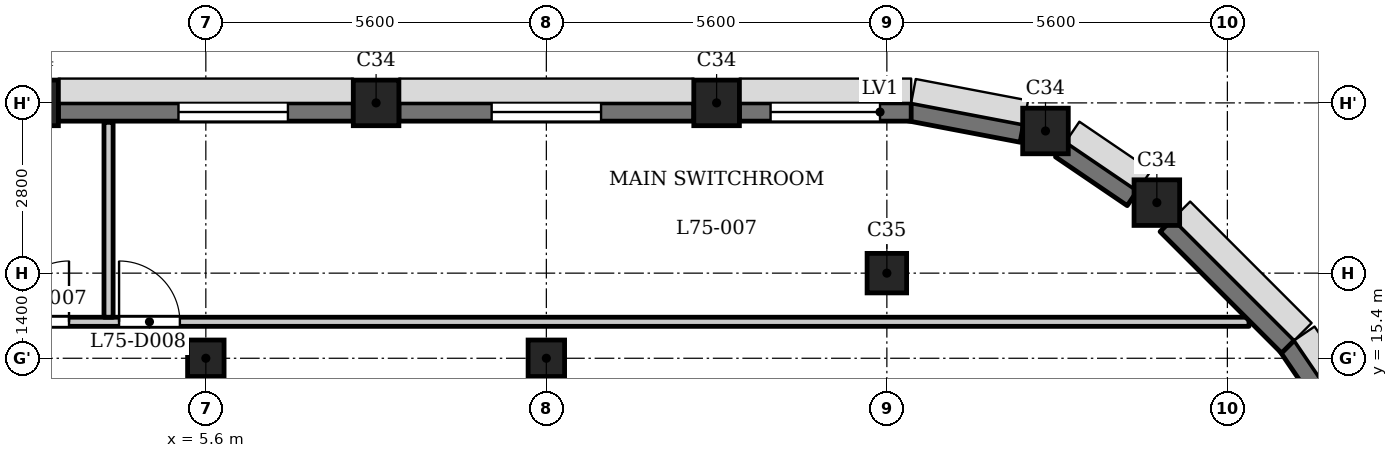
"""IFC4 building model, lengths in metres.
Left out: names, types, materials, properties, quantities, classifications, styles, units other than length and angle.
Written with IfcOpenShell. Run it as: python <this file> out.ifc"""

import sys

from ifc_helpers import new_model, si_unit, direction, frame, frame_2d, origin, origin_2d, place, context, subcontext, project, spatial, rectangle, extrude, element, fill, save


model = new_model("IFC4")
c1 = context("Model", 3, precision=1e-05, world=origin(), true_north=direction((0.0, 1.0)))
c2 = subcontext(c1, "Body", "Model", "MODEL_VIEW")
j1 = project(units=[si_unit("LENGTHUNIT", "METRE"), si_unit("PLANEANGLEUNIT", "RADIAN")], contexts=[c1])
p1 = place(None, origin())
s1 = spatial("IfcSite", under=j1, at=p1, CompositionType="ELEMENT")
p2 = place(p1, origin())
s2 = spatial("IfcBuilding", under=s1, at=p2, CompositionType="ELEMENT")
p3 = place(p2, frame((0.0, 0.0, 289.1)))
s3 = spatial("IfcBuildingStorey", under=s2, at=p3, CompositionType="ELEMENT", Elevation=289.1)
for number, where, z_axis, x_axis in (
    (1, (21.24, 17.96, 0.0), (0.0, 0.0, 1.0), (1.0, 0.0, 0.0)),
    (2, (19.409, 19.138, 0.0), (0.0, 0.0, 1.0), (1.0, 0.0, 0.0)),
    (3, (14.0, 19.6, 0.0), (0.0, 0.0, 1.0), (1.0, 0.0, 0.0)),
    (4, (8.4, 19.6, 0.0), (0.0, 0.0, 1.0), (1.0, 0.0, 0.0)),
    (5, (2.8, 19.6, 0.0), (0.0, 0.0, 1.0), (1.0, 0.0, 0.0)),
):
    element("IfcColumn", number, at=place(p3, frame(where, z_axis=z_axis, x_axis=x_axis)), inside=s3, PredefinedType="COLUMN", context=c2, shape_type="SweptSolid", body=[
        extrude(rectangle(XDim=0.75, YDim=0.75, at=origin_2d()), origin(), (0.0, 0.0, 1.0), 5.4),
    ])
p4 = place(p3, frame((16.8, 16.8, 0.0), z_axis=(0.0, 0.0, 1.0), x_axis=(1.0, 0.0, 0.0)))
e6 = element("IfcColumn", 6, at=p4, inside=s3, PredefinedType="COLUMN", context=c2, shape_type="SweptSolid", body=[
    extrude(rectangle(XDim=0.65, YDim=0.65, at=origin_2d()), origin(), (0.0, 0.0, 1.0), 5.4),
])
for number, where, z_axis, x_axis in (
    (7, (5.6, 15.4, 0.0), (0.0, 0.0, 1.0), (1.0, 0.0, 0.0)),
    (8, (11.2, 15.4, 0.0), (0.0, 0.0, 1.0), (1.0, 0.0, 0.0)),
):
    element("IfcColumn", number, at=place(p3, frame(where, z_axis=z_axis, x_axis=x_axis)), inside=s3, PredefinedType="COLUMN", context=c2, shape_type="SweptSolid", body=[
        extrude(rectangle(XDim=0.6, YDim=0.6, at=origin_2d()), origin(), (0.0, 0.0, 1.0), 5.4),
    ])
p5 = place(p3, frame((24.436, 14.057, 0.0), z_axis=(0.0, 0.0, 1.0), x_axis=(-0.562075713892, 0.827085782645, 0.0)))
e9 = element("IfcWall", 9, at=p5, inside=s3, PredefinedType="SOLIDWALL", context=c2, shape_type="SweptSolid", body=[
    extrude(rectangle(XDim=1.881, YDim=0.3, at=frame_2d((0.94, 0.0))), origin(), (0.0, 0.0, 1.0), 3.2),
])
p6 = place(p3, frame((23.397, 15.591, 0.0), z_axis=(0.0, 0.0, 1.0), x_axis=(-0.707106781187, 0.707106781187, 0.0)))
e10 = element("IfcWall", 10, at=p6, inside=s3, PredefinedType="SOLIDWALL", context=c2, shape_type="SweptSolid", body=[
    extrude(rectangle(XDim=2.825, YDim=0.3, at=frame_2d((1.413, 0.0))), origin(), (0.0, 0.0, 1.0), 3.2),
])
p7 = place(p3, frame((20.837, 18.034, 0.0), z_axis=(0.0, 0.0, 1.0), x_axis=(-0.827095130818, 0.562061957952, 0.0)))
e11 = element("IfcWall", 11, at=p7, inside=s3, PredefinedType="SOLIDWALL", context=c2, shape_type="SweptSolid", body=[
    extrude(rectangle(XDim=1.427, YDim=0.3, at=frame_2d((0.713, 0.0))), origin(), (0.0, 0.0, 1.0), 3.2),
])
p8 = place(p3, frame((19.02, 19.1, 0.0), z_axis=(0.0, 0.0, 1.0), x_axis=(-0.982284001233, 0.187398348234, 0.0)))
e12 = element("IfcWall", 12, at=p8, inside=s3, PredefinedType="SOLIDWALL", context=c2, shape_type="SweptSolid", body=[
    extrude(rectangle(XDim=1.881, YDim=0.3, at=frame_2d((0.941, 0.0))), origin(), (0.0, 0.0, 1.0), 3.2),
])
p9 = place(p3, frame((17.2, 19.45, 0.0), z_axis=(0.0, 0.0, 1.0), x_axis=(-1.0, 0.0, 0.0)))
e13 = element("IfcWall", 13, at=p9, inside=s3, PredefinedType="SOLIDWALL", context=c2, shape_type="SweptSolid", body=[
    extrude(rectangle(XDim=2.825, YDim=0.3, at=frame_2d((1.413, 0.0))), origin(), (0.0, 0.0, 1.0), 3.2),
])
p10 = place(p9, frame((0.512, 0.0, 0.9)))
e14 = element("IfcOpeningElement", 14, at=p10, cuts=e13, PredefinedType="OPENING", context=c2, shape_type="SweptSolid", body=[
    extrude(rectangle(XDim=1.8, YDim=1.5, at=frame_2d((0.9, 0.75))), frame((0.0, 0.16, 0.0), z_axis=(0.0, -1.0, 0.0), x_axis=(1.0, 0.0, 0.0)), (0.0, 0.0, 1.0), 0.32),
])
p11 = place(p3, frame((13.625, 19.45, 0.0), z_axis=(0.0, 0.0, 1.0), x_axis=(-1.0, 0.0, 0.0)))
e15 = element("IfcWall", 15, at=p11, inside=s3, PredefinedType="SOLIDWALL", context=c2, shape_type="SweptSolid", body=[
    extrude(rectangle(XDim=4.85, YDim=0.3, at=frame_2d((2.425, 0.0))), origin(), (0.0, 0.0, 1.0), 3.2),
])
p12 = place(p11, frame((1.525, 0.0, 0.9)))
e16 = element("IfcOpeningElement", 16, at=p12, cuts=e15, PredefinedType="OPENING", context=c2, shape_type="SweptSolid", body=[
    extrude(rectangle(XDim=1.8, YDim=1.5, at=frame_2d((0.9, 0.75))), frame((0.0, 0.16, 0.0), z_axis=(0.0, -1.0, 0.0), x_axis=(1.0, 0.0, 0.0)), (0.0, 0.0, 1.0), 0.32),
])
p13 = place(p3, frame((8.025, 19.45, 0.0), z_axis=(0.0, 0.0, 1.0), x_axis=(-1.0, 0.0, 0.0)))
e17 = element("IfcWall", 17, at=p13, inside=s3, PredefinedType="SOLIDWALL", context=c2, shape_type="SweptSolid", body=[
    extrude(rectangle(XDim=4.85, YDim=0.3, at=frame_2d((2.425, 0.0))), origin(), (0.0, 0.0, 1.0), 3.2),
])
p14 = place(p13, frame((1.075, 0.0, 0.9)))
e18 = element("IfcOpeningElement", 18, at=p14, cuts=e17, PredefinedType="OPENING", context=c2, shape_type="SweptSolid", body=[
    extrude(rectangle(XDim=1.8, YDim=1.5, at=frame_2d((0.9, 0.75))), frame((0.0, 0.16, 0.0), z_axis=(0.0, -1.0, 0.0), x_axis=(1.0, 0.0, 0.0)), (0.0, 0.0, 1.0), 0.32),
])
p15 = place(p3, frame((-22.756, 16.0, 0.0), z_axis=(0.0, 0.0, 1.0), x_axis=(1.0, 0.0, 0.0)))
e19 = element("IfcWall", 19, at=p15, inside=s3, PredefinedType="PARTITIONING", context=c2, shape_type="SweptSolid", body=[
    extrude(rectangle(XDim=45.511, YDim=0.15, at=frame_2d((22.756, 0.0))), origin(), (0.0, 0.0, 1.0), 5.0),
])
p16 = place(p15, frame((2.106, 0.0, 0.0)))
e20 = element("IfcOpeningElement", 20, at=p16, cuts=e19, PredefinedType="OPENING", context=c2, shape_type="SweptSolid", body=[
    extrude(rectangle(XDim=1.0, YDim=2.1, at=frame_2d((0.5, 1.05))), frame((0.0, 0.085, 0.0), z_axis=(0.0, -1.0, 0.0), x_axis=(1.0, 0.0, 0.0)), (0.0, 0.0, 1.0), 0.17),
])
p17 = place(p15, frame((4.356, 0.0, 0.0)))
e21 = element("IfcOpeningElement", 21, at=p17, cuts=e19, PredefinedType="OPENING", context=c2, shape_type="SweptSolid", body=[
    extrude(rectangle(XDim=1.0, YDim=2.1, at=frame_2d((0.5, 1.05))), frame((0.0, 0.085, 0.0), z_axis=(0.0, -1.0, 0.0), x_axis=(1.0, 0.0, 0.0)), (0.0, 0.0, 1.0), 0.17),
])
p18 = place(p15, frame((25.106, 0.0, 0.0)))
e22 = element("IfcOpeningElement", 22, at=p18, cuts=e19, PredefinedType="OPENING", context=c2, shape_type="SweptSolid", body=[
    extrude(rectangle(XDim=1.0, YDim=2.1, at=frame_2d((0.5, 1.05))), frame((0.0, 0.085, 0.0), z_axis=(0.0, -1.0, 0.0), x_axis=(1.0, 0.0, 0.0)), (0.0, 0.0, 1.0), 0.17),
])
p19 = place(p15, frame((26.929, 0.0, 0.0)))
e23 = element("IfcOpeningElement", 23, at=p19, cuts=e19, PredefinedType="OPENING", context=c2, shape_type="SweptSolid", body=[
    extrude(rectangle(XDim=1.0, YDim=2.1, at=frame_2d((0.5, 1.05))), frame((0.0, 0.085, 0.0), z_axis=(0.0, -1.0, 0.0), x_axis=(1.0, 0.0, 0.0)), (0.0, 0.0, 1.0), 0.17),
])
p20 = place(p3, frame((4.0, 16.075, 0.0), z_axis=(0.0, 0.0, 1.0), x_axis=(0.0, 1.0, 0.0)))
e24 = element("IfcWall", 24, at=p20, inside=s3, PredefinedType="PARTITIONING", context=c2, shape_type="SweptSolid", body=[
    extrude(rectangle(XDim=3.205, YDim=0.15, at=frame_2d((1.603, 0.0))), origin(), (0.0, 0.0, 1.0), 5.0),
])
p21 = place(p18, origin())
e25 = element("IfcDoor", 25, at=p21, inside=s3, OperationType="SINGLE_SWING_LEFT", PredefinedType="DOOR", context=c2, shape_type="SweptSolid", body=[
    extrude(rectangle(XDim=1.0, YDim=2.1, at=frame_2d((0.5, 1.05))), frame((0.0, 0.025, 0.0), z_axis=(0.0, -1.0, 0.0), x_axis=(1.0, 0.0, 0.0)), (0.0, 0.0, 1.0), 0.05),
])
fill(e22, e25)
p22 = place(p19, origin())
e26 = element("IfcDoor", 26, at=p22, inside=s3, OperationType="SINGLE_SWING_RIGHT", PredefinedType="DOOR", context=c2, shape_type="SweptSolid", body=[
    extrude(rectangle(XDim=1.0, YDim=2.1, at=frame_2d((0.5, 1.05))), frame((0.0, 0.025, 0.0), z_axis=(0.0, -1.0, 0.0), x_axis=(1.0, 0.0, 0.0)), (0.0, 0.0, 1.0), 0.05),
])
fill(e23, e26)
p23 = place(p10, origin())
e27 = element("IfcWindow", 27, at=p23, inside=s3, PartitioningType="SINGLE_PANEL", PredefinedType="WINDOW", context=c2, shape_type="SweptSolid", body=[
    extrude(rectangle(XDim=1.8, YDim=1.5, at=frame_2d((0.9, 0.75))), frame((0.0, 0.03, 0.0), z_axis=(0.0, -1.0, 0.0), x_axis=(1.0, 0.0, 0.0)), (0.0, 0.0, 1.0), 0.06),
])
fill(e14, e27)
p24 = place(p12, origin())
e28 = element("IfcWindow", 28, at=p24, inside=s3, PartitioningType="SINGLE_PANEL", PredefinedType="WINDOW", context=c2, shape_type="SweptSolid", body=[
    extrude(rectangle(XDim=1.8, YDim=1.5, at=frame_2d((0.9, 0.75))), frame((0.0, 0.03, 0.0), z_axis=(0.0, -1.0, 0.0), x_axis=(1.0, 0.0, 0.0)), (0.0, 0.0, 1.0), 0.06),
])
fill(e16, e28)
p25 = place(p14, origin())
e29 = element("IfcWindow", 29, at=p25, inside=s3, PartitioningType="SINGLE_PANEL", PredefinedType="WINDOW", context=c2, shape_type="SweptSolid", body=[
    extrude(rectangle(XDim=1.8, YDim=1.5, at=frame_2d((0.9, 0.75))), frame((0.0, 0.03, 0.0), z_axis=(0.0, -1.0, 0.0), x_axis=(1.0, 0.0, 0.0)), (0.0, 0.0, 1.0), 0.06),
])
fill(e18, e29)
save(model, sys.argv[1])
